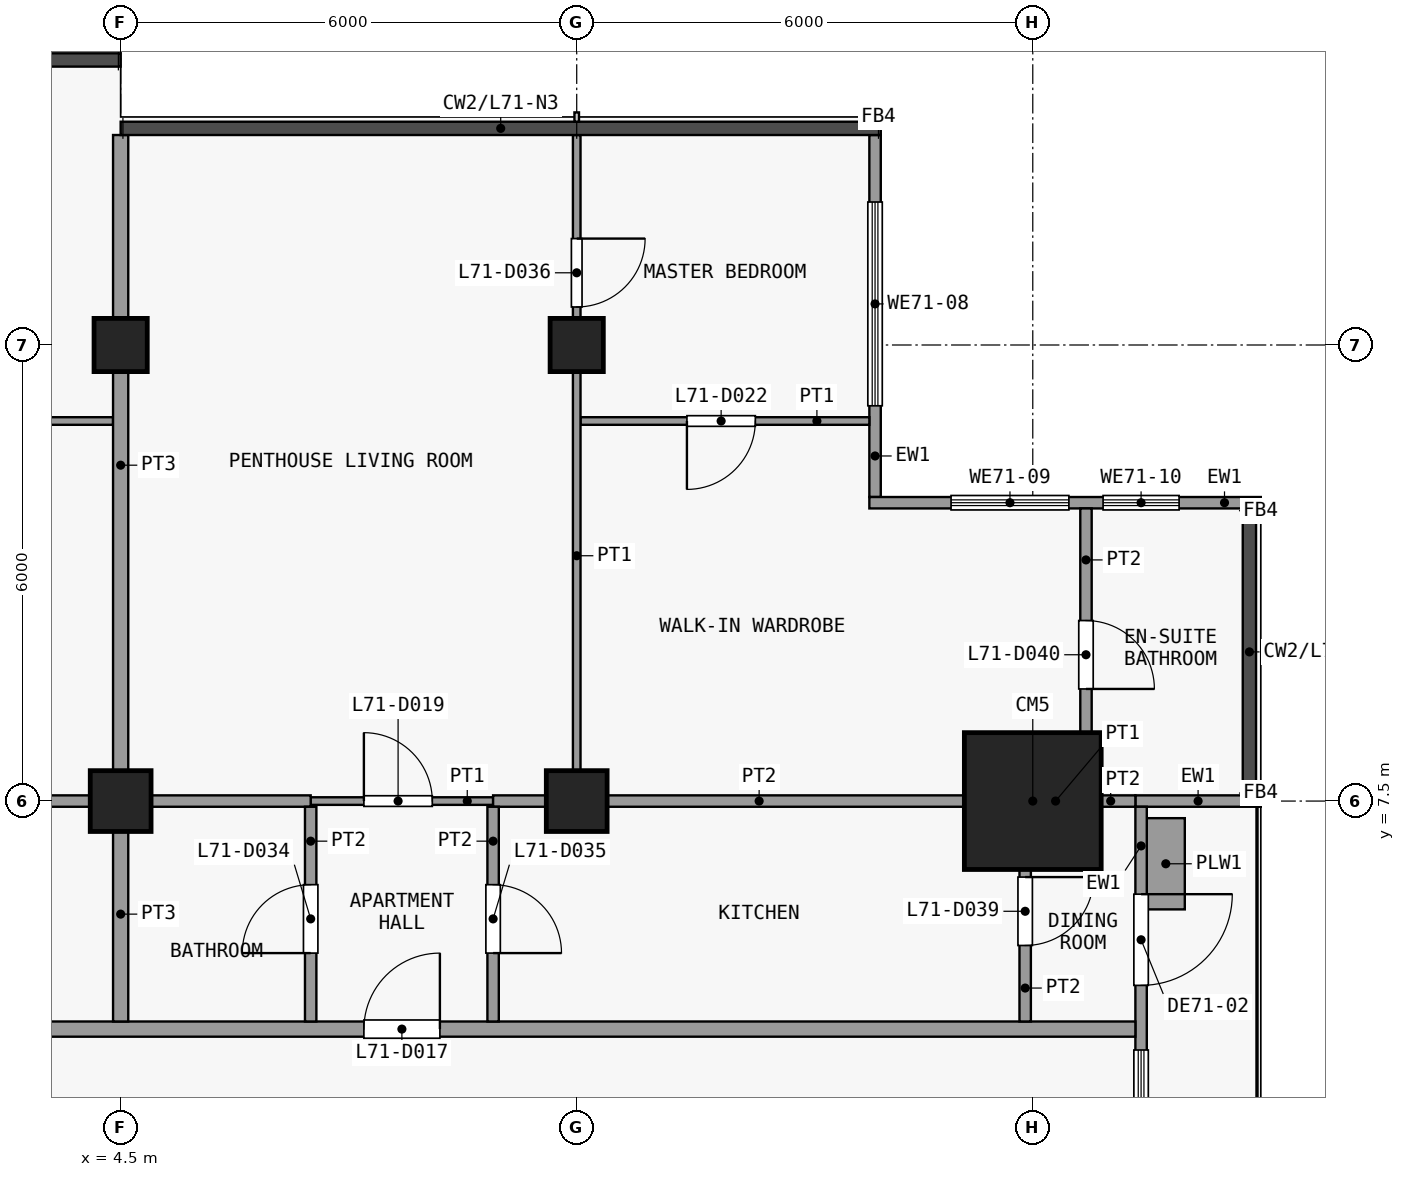
"""IFC4 building model, lengths in metres.
Left out: names, types, materials, properties, quantities, classifications, styles, units other than length and angle.
Written with IfcOpenShell. Run it as: python <this file> out.ifc"""

import sys

from ifc_helpers import new_model, si_unit, direction, frame, frame_2d, origin, origin_2d, place, context, subcontext, project, spatial, rectangle, extrude, element, fill, save


model = new_model("IFC4")
c1 = context("Model", 3, precision=1e-05, world=origin(), true_north=direction((0.0, 1.0)))
c2 = subcontext(c1, "Body", "Model", "MODEL_VIEW")
j1 = project(units=[si_unit("LENGTHUNIT", "METRE"), si_unit("PLANEANGLEUNIT", "RADIAN")], contexts=[c1])
p1 = place(None, origin())
s1 = spatial("IfcSite", under=j1, at=p1, CompositionType="ELEMENT")
p2 = place(p1, origin())
s2 = spatial("IfcBuilding", under=s1, at=p2, CompositionType="ELEMENT")
p3 = place(p2, frame((0.0, 0.0, 280.7)))
s3 = spatial("IfcBuildingStorey", under=s2, at=p3, CompositionType="ELEMENT", Elevation=280.7)
p4 = place(p3, frame((4.5, 7.5, 0.0), z_axis=(0.0, 0.0, 1.0), x_axis=(1.0, 0.0, 0.0)))
e1 = element("IfcColumn", 1, at=p4, inside=s3, PredefinedType="COLUMN", context=c2, shape_type="SweptSolid", body=[
    extrude(rectangle(XDim=0.8, YDim=0.8, at=origin_2d()), origin(), (0.0, 0.0, 1.0), 3.6),
])
p5 = place(p3, frame((4.5, 13.5, 0.0), z_axis=(0.0, 0.0, 1.0), x_axis=(1.0, 0.0, 0.0)))
e2 = element("IfcColumn", 2, at=p5, inside=s3, PredefinedType="COLUMN", context=c2, shape_type="SweptSolid", body=[
    extrude(rectangle(XDim=0.7, YDim=0.7, at=origin_2d()), origin(), (0.0, 0.0, 1.0), 3.6),
])
p6 = place(p3, frame((10.5, 7.5, 0.0), z_axis=(0.0, 0.0, 1.0), x_axis=(1.0, 0.0, 0.0)))
e3 = element("IfcColumn", 3, at=p6, inside=s3, PredefinedType="COLUMN", context=c2, shape_type="SweptSolid", body=[
    extrude(rectangle(XDim=0.8, YDim=0.8, at=origin_2d()), origin(), (0.0, 0.0, 1.0), 3.6),
])
p7 = place(p3, frame((10.5, 13.5, 0.0), z_axis=(0.0, 0.0, 1.0), x_axis=(1.0, 0.0, 0.0)))
e4 = element("IfcColumn", 4, at=p7, inside=s3, PredefinedType="COLUMN", context=c2, shape_type="SweptSolid", body=[
    extrude(rectangle(XDim=0.7, YDim=0.7, at=origin_2d()), origin(), (0.0, 0.0, 1.0), 3.6),
])
p8 = place(p3, frame((16.5, 7.5, 0.0), z_axis=(0.0, 0.0, 1.0), x_axis=(1.0, 0.0, 0.0)))
e5 = element("IfcColumn", 5, at=p8, inside=s3, PredefinedType="COLUMN", context=c2, shape_type="SweptSolid", body=[
    extrude(rectangle(XDim=1.8, YDim=1.8, at=origin_2d()), origin(), (0.0, 0.0, 1.0), 3.6),
])
p9 = place(p3, frame((14.425, 16.262, 0.0), z_axis=(0.0, 0.0, 1.0), x_axis=(0.0, -1.0, 0.0)))
e6 = element("IfcWall", 6, at=p9, inside=s3, PredefinedType="SOLIDWALL", context=c2, shape_type="SweptSolid", body=[
    extrude(rectangle(XDim=4.762, YDim=0.15, at=frame_2d((2.381, 0.0))), origin(), (0.0, 0.0, 1.0), 3.3),
])
p10 = place(p9, frame((0.881, 0.0, 0.9)))
e7 = element("IfcOpeningElement", 7, at=p10, cuts=e6, PredefinedType="OPENING", context=c2, shape_type="SweptSolid", body=[
    extrude(rectangle(XDim=2.681, YDim=2.4, at=frame_2d((1.34, 1.2))), frame((0.0, 0.085, 0.0), z_axis=(0.0, -1.0, 0.0), x_axis=(1.0, 0.0, 0.0)), (0.0, 0.0, 1.0), 0.17),
])
p11 = place(p3, frame((14.35, 11.425, 0.0), z_axis=(0.0, 0.0, 1.0), x_axis=(1.0, 0.0, 0.0)))
e8 = element("IfcWall", 8, at=p11, inside=s3, PredefinedType="SOLIDWALL", context=c2, shape_type="SweptSolid", body=[
    extrude(rectangle(XDim=5.15, YDim=0.15, at=frame_2d((2.575, 0.0))), origin(), (0.0, 0.0, 1.0), 3.3),
])
p12 = place(p11, frame((1.075, 0.0, 0.9)))
e9 = element("IfcOpeningElement", 9, at=p12, cuts=e8, PredefinedType="OPENING", context=c2, shape_type="SweptSolid", body=[
    extrude(rectangle(XDim=1.55, YDim=2.4, at=frame_2d((0.775, 1.2))), frame((0.0, 0.085, 0.0), z_axis=(0.0, -1.0, 0.0), x_axis=(1.0, 0.0, 0.0)), (0.0, 0.0, 1.0), 0.17),
])
p13 = place(p11, frame((3.075, 0.0, 0.9)))
e10 = element("IfcOpeningElement", 10, at=p13, cuts=e8, PredefinedType="OPENING", context=c2, shape_type="SweptSolid", body=[
    extrude(rectangle(XDim=1.0, YDim=2.4, at=frame_2d((0.5, 1.2))), frame((0.0, 0.085, 0.0), z_axis=(0.0, -1.0, 0.0), x_axis=(1.0, 0.0, 0.0)), (0.0, 0.0, 1.0), 0.17),
])
p14 = place(p3, frame((17.85, 7.5, 0.0), z_axis=(0.0, 0.0, 1.0), x_axis=(1.0, 0.0, 0.0)))
e11 = element("IfcWall", 11, at=p14, inside=s3, PredefinedType="SOLIDWALL", context=c2, shape_type="SweptSolid", body=[
    extrude(rectangle(XDim=1.65, YDim=0.15, at=frame_2d((0.825, 0.0))), origin(), (0.0, 0.0, 1.0), 3.3),
])
p15 = place(p3, frame((17.925, 7.425, 0.0), z_axis=(0.0, 0.0, 1.0), x_axis=(0.0, -1.0, 0.0)))
e12 = element("IfcWall", 12, at=p15, inside=s3, PredefinedType="SOLIDWALL", context=c2, shape_type="SweptSolid", body=[
    extrude(rectangle(XDim=5.85, YDim=0.15, at=frame_2d((2.925, 0.0))), origin(), (0.0, 0.0, 1.0), 3.3),
])
p16 = place(p15, frame((1.15, 0.0, 0.0)))
e13 = element("IfcOpeningElement", 13, at=p16, cuts=e12, PredefinedType="OPENING", context=c2, shape_type="SweptSolid", body=[
    extrude(rectangle(XDim=1.2, YDim=2.4, at=frame_2d((0.6, 1.2))), frame((0.0, 0.085, 0.0), z_axis=(0.0, -1.0, 0.0), x_axis=(1.0, 0.0, 0.0)), (0.0, 0.0, 1.0), 0.17),
])
p17 = place(p15, frame((3.2, 0.0, 0.9)))
e14 = element("IfcOpeningElement", 14, at=p17, cuts=e12, PredefinedType="OPENING", context=c2, shape_type="SweptSolid", body=[
    extrude(rectangle(XDim=1.8, YDim=2.1, at=frame_2d((0.9, 1.05))), frame((0.0, 0.085, 0.0), z_axis=(0.0, -1.0, 0.0), x_axis=(1.0, 0.0, 0.0)), (0.0, 0.0, 1.0), 0.17),
])
p18 = place(p3, frame((18.25, 6.075, 0.0), z_axis=(0.0, 0.0, 1.0), x_axis=(0.0, 1.0, 0.0)))
e15 = element("IfcWall", 15, at=p18, inside=s3, PredefinedType="USERDEFINED", context=c2, shape_type="SweptSolid", body=[
    extrude(rectangle(XDim=1.2, YDim=0.5, at=frame_2d((0.6, 0.0))), origin(), (0.0, 0.0, 1.0), 0.9),
])
p19 = place(p3, frame((-20.25, 4.5, 0.0), z_axis=(0.0, 0.0, 1.0), x_axis=(1.0, 0.0, 0.0)))
e16 = element("IfcWall", 16, at=p19, inside=s3, PredefinedType="PARTITIONING", context=c2, shape_type="SweptSolid", body=[
    extrude(rectangle(XDim=38.1, YDim=0.2, at=frame_2d((19.05, 0.0))), origin(), (0.0, 0.0, 1.0), 3.3),
])
p20 = place(p19, frame((13.95, 0.0, 0.0)))
e17 = element("IfcOpeningElement", 17, at=p20, cuts=e16, PredefinedType="OPENING", context=c2, shape_type="SweptSolid", body=[
    extrude(rectangle(XDim=1.0, YDim=2.1, at=frame_2d((0.5, 1.05))), frame((0.0, 0.11, 0.0), z_axis=(0.0, -1.0, 0.0), x_axis=(1.0, 0.0, 0.0)), (0.0, 0.0, 1.0), 0.22),
])
p21 = place(p19, frame((27.95, 0.0, 0.0)))
e18 = element("IfcOpeningElement", 18, at=p21, cuts=e16, PredefinedType="OPENING", context=c2, shape_type="SweptSolid", body=[
    extrude(rectangle(XDim=1.0, YDim=2.1, at=frame_2d((0.5, 1.05))), frame((0.0, 0.11, 0.0), z_axis=(0.0, -1.0, 0.0), x_axis=(1.0, 0.0, 0.0)), (0.0, 0.0, 1.0), 0.22),
])
p22 = place(p3, frame((7.0, 7.5, 0.0), z_axis=(0.0, 0.0, 1.0), x_axis=(1.0, 0.0, 0.0)))
e19 = element("IfcWall", 19, at=p22, inside=s3, PredefinedType="PARTITIONING", context=c2, shape_type="SweptSolid", body=[
    extrude(rectangle(XDim=2.4, YDim=0.1, at=frame_2d((1.2, 0.0))), origin(), (0.0, 0.0, 1.0), 3.3),
])
p23 = place(p22, frame((0.7, 0.0, 0.0)))
e20 = element("IfcOpeningElement", 20, at=p23, cuts=e19, PredefinedType="OPENING", context=c2, shape_type="SweptSolid", body=[
    extrude(rectangle(XDim=0.9, YDim=2.1, at=frame_2d((0.45, 1.05))), frame((0.0, 0.06, 0.0), z_axis=(0.0, -1.0, 0.0), x_axis=(1.0, 0.0, 0.0)), (0.0, 0.0, 1.0), 0.12),
])
p24 = place(p3, frame((16.4, 7.5, 0.0), z_axis=(0.0, 0.0, 1.0), x_axis=(1.0, 0.0, 0.0)))
e21 = element("IfcWall", 21, at=p24, inside=s3, PredefinedType="PARTITIONING", context=c2, shape_type="SweptSolid", body=[
    extrude(rectangle(XDim=0.8, YDim=0.1, at=frame_2d((0.4, 0.0))), origin(), (0.0, 0.0, 1.0), 3.3),
])
p25 = place(p3, frame((-4.5, 7.5, 0.0), z_axis=(0.0, 0.0, 1.0), x_axis=(1.0, 0.0, 0.0)))
e22 = element("IfcWall", 22, at=p25, inside=s3, PredefinedType="PARTITIONING", context=c2, shape_type="SweptSolid", body=[
    extrude(rectangle(XDim=11.5, YDim=0.15, at=frame_2d((5.75, 0.0))), origin(), (0.0, 0.0, 1.0), 3.3),
])
p26 = place(p3, frame((9.4, 7.5, 0.0), z_axis=(0.0, 0.0, 1.0), x_axis=(1.0, 0.0, 0.0)))
e23 = element("IfcWall", 23, at=p26, inside=s3, PredefinedType="PARTITIONING", context=c2, shape_type="SweptSolid", body=[
    extrude(rectangle(XDim=7.0, YDim=0.15, at=frame_2d((3.5, 0.0))), origin(), (0.0, 0.0, 1.0), 3.3),
])
p27 = place(p3, frame((17.2, 7.5, 0.0), z_axis=(0.0, 0.0, 1.0), x_axis=(1.0, 0.0, 0.0)))
e24 = element("IfcWall", 24, at=p27, inside=s3, PredefinedType="PARTITIONING", context=c2, shape_type="SweptSolid", body=[
    extrude(rectangle(XDim=0.65, YDim=0.15, at=frame_2d((0.325, 0.0))), origin(), (0.0, 0.0, 1.0), 3.3),
])
p28 = place(p3, frame((-4.45, 12.5, 0.0), z_axis=(0.0, 0.0, 1.0), x_axis=(1.0, 0.0, 0.0)))
e25 = element("IfcWall", 25, at=p28, inside=s3, PredefinedType="PARTITIONING", context=c2, shape_type="SweptSolid", body=[
    extrude(rectangle(XDim=8.85, YDim=0.1, at=frame_2d((4.425, 0.0))), origin(), (0.0, 0.0, 1.0), 3.3),
])
p29 = place(p28, frame((4.0, 0.0, 0.0)))
e26 = element("IfcOpeningElement", 26, at=p29, cuts=e25, PredefinedType="OPENING", context=c2, shape_type="SweptSolid", body=[
    extrude(rectangle(XDim=0.9, YDim=2.1, at=frame_2d((0.45, 1.05))), frame((0.0, 0.06, 0.0), z_axis=(0.0, -1.0, 0.0), x_axis=(1.0, 0.0, 0.0)), (0.0, 0.0, 1.0), 0.12),
])
p30 = place(p3, frame((10.55, 12.5, 0.0), z_axis=(0.0, 0.0, 1.0), x_axis=(1.0, 0.0, 0.0)))
e27 = element("IfcWall", 27, at=p30, inside=s3, PredefinedType="PARTITIONING", context=c2, shape_type="SweptSolid", body=[
    extrude(rectangle(XDim=3.8, YDim=0.1, at=frame_2d((1.9, 0.0))), origin(), (0.0, 0.0, 1.0), 3.3),
])
p31 = place(p30, frame((1.4, 0.0, 0.0)))
e28 = element("IfcOpeningElement", 28, at=p31, cuts=e27, PredefinedType="OPENING", context=c2, shape_type="SweptSolid", body=[
    extrude(rectangle(XDim=0.9, YDim=2.1, at=frame_2d((0.45, 1.05))), frame((0.0, 0.06, 0.0), z_axis=(0.0, -1.0, 0.0), x_axis=(1.0, 0.0, 0.0)), (0.0, 0.0, 1.0), 0.12),
])
p32 = place(p3, frame((4.5, 4.6, 0.0), z_axis=(0.0, 0.0, 1.0), x_axis=(0.0, 1.0, 0.0)))
e29 = element("IfcWall", 29, at=p32, inside=s3, PredefinedType="PARTITIONING", context=c2, shape_type="SweptSolid", body=[
    extrude(rectangle(XDim=2.825, YDim=0.2, at=frame_2d((1.413, 0.0))), origin(), (0.0, 0.0, 1.0), 3.3),
])
p33 = place(p3, frame((4.5, 7.575, 0.0), z_axis=(0.0, 0.0, 1.0), x_axis=(0.0, 1.0, 0.0)))
e30 = element("IfcWall", 30, at=p33, inside=s3, PredefinedType="PARTITIONING", context=c2, shape_type="SweptSolid", body=[
    extrude(rectangle(XDim=8.688, YDim=0.2, at=frame_2d((4.344, 0.0))), origin(), (0.0, 0.0, 1.0), 3.3),
])
p34 = place(p3, frame((7.0, 4.6, 0.0), z_axis=(0.0, 0.0, 1.0), x_axis=(0.0, 1.0, 0.0)))
e31 = element("IfcWall", 31, at=p34, inside=s3, PredefinedType="PARTITIONING", context=c2, shape_type="SweptSolid", body=[
    extrude(rectangle(XDim=2.825, YDim=0.15, at=frame_2d((1.413, 0.0))), origin(), (0.0, 0.0, 1.0), 3.3),
])
p35 = place(p34, frame((0.9, 0.0, 0.0)))
e32 = element("IfcOpeningElement", 32, at=p35, cuts=e31, PredefinedType="OPENING", context=c2, shape_type="SweptSolid", body=[
    extrude(rectangle(XDim=0.9, YDim=2.1, at=frame_2d((0.45, 1.05))), frame((0.0, 0.085, 0.0), z_axis=(0.0, -1.0, 0.0), x_axis=(1.0, 0.0, 0.0)), (0.0, 0.0, 1.0), 0.17),
])
p36 = place(p3, frame((9.4, 4.6, 0.0), z_axis=(0.0, 0.0, 1.0), x_axis=(0.0, 1.0, 0.0)))
e33 = element("IfcWall", 33, at=p36, inside=s3, PredefinedType="PARTITIONING", context=c2, shape_type="SweptSolid", body=[
    extrude(rectangle(XDim=2.825, YDim=0.15, at=frame_2d((1.413, 0.0))), origin(), (0.0, 0.0, 1.0), 3.3),
])
p37 = place(p36, frame((0.9, 0.0, 0.0)))
e34 = element("IfcOpeningElement", 34, at=p37, cuts=e33, PredefinedType="OPENING", context=c2, shape_type="SweptSolid", body=[
    extrude(rectangle(XDim=0.9, YDim=2.1, at=frame_2d((0.45, 1.05))), frame((0.0, 0.085, 0.0), z_axis=(0.0, -1.0, 0.0), x_axis=(1.0, 0.0, 0.0)), (0.0, 0.0, 1.0), 0.17),
])
p38 = place(p3, frame((10.5, 7.575, 0.0), z_axis=(0.0, 0.0, 1.0), x_axis=(0.0, 1.0, 0.0)))
e35 = element("IfcWall", 35, at=p38, inside=s3, PredefinedType="PARTITIONING", context=c2, shape_type="SweptSolid", body=[
    extrude(rectangle(XDim=8.688, YDim=0.1, at=frame_2d((4.344, 0.0))), origin(), (0.0, 0.0, 1.0), 3.3),
])
p39 = place(p38, frame((6.425, 0.0, 0.0)))
e36 = element("IfcOpeningElement", 36, at=p39, cuts=e35, PredefinedType="OPENING", context=c2, shape_type="SweptSolid", body=[
    extrude(rectangle(XDim=0.9, YDim=2.1, at=frame_2d((0.45, 1.05))), frame((0.0, 0.06, 0.0), z_axis=(0.0, -1.0, 0.0), x_axis=(1.0, 0.0, 0.0)), (0.0, 0.0, 1.0), 0.12),
])
p40 = place(p3, frame((16.4, 4.6, 0.0), z_axis=(0.0, 0.0, 1.0), x_axis=(0.0, 1.0, 0.0)))
e37 = element("IfcWall", 37, at=p40, inside=s3, PredefinedType="PARTITIONING", context=c2, shape_type="SweptSolid", body=[
    extrude(rectangle(XDim=2.825, YDim=0.15, at=frame_2d((1.413, 0.0))), origin(), (0.0, 0.0, 1.0), 3.3),
])
p41 = place(p40, frame((1.0, 0.0, 0.0)))
e38 = element("IfcOpeningElement", 38, at=p41, cuts=e37, PredefinedType="OPENING", context=c2, shape_type="SweptSolid", body=[
    extrude(rectangle(XDim=0.9, YDim=2.1, at=frame_2d((0.45, 1.05))), frame((0.0, 0.085, 0.0), z_axis=(0.0, -1.0, 0.0), x_axis=(1.0, 0.0, 0.0)), (0.0, 0.0, 1.0), 0.17),
])
p42 = place(p3, frame((17.2, 7.575, 0.0), z_axis=(0.0, 0.0, 1.0), x_axis=(0.0, 1.0, 0.0)))
e39 = element("IfcWall", 39, at=p42, inside=s3, PredefinedType="PARTITIONING", context=c2, shape_type="SweptSolid", body=[
    extrude(rectangle(XDim=3.775, YDim=0.15, at=frame_2d((1.888, 0.0))), origin(), (0.0, 0.0, 1.0), 3.3),
])
p43 = place(p42, frame((1.4, 0.0, 0.0)))
e40 = element("IfcOpeningElement", 40, at=p43, cuts=e39, PredefinedType="OPENING", context=c2, shape_type="SweptSolid", body=[
    extrude(rectangle(XDim=0.9, YDim=2.1, at=frame_2d((0.45, 1.05))), frame((0.0, 0.085, 0.0), z_axis=(0.0, -1.0, 0.0), x_axis=(1.0, 0.0, 0.0)), (0.0, 0.0, 1.0), 0.17),
])
p44 = place(p10, origin())
e41 = element("IfcWindow", 41, at=p44, inside=s3, PartitioningType="SINGLE_PANEL", PredefinedType="WINDOW", context=c2, shape_type="SweptSolid", body=[
    extrude(rectangle(XDim=2.681, YDim=2.4, at=frame_2d((1.34, 1.2))), frame((0.0, 0.03, 0.0), z_axis=(0.0, -1.0, 0.0), x_axis=(1.0, 0.0, 0.0)), (0.0, 0.0, 1.0), 0.06),
])
fill(e7, e41)
p45 = place(p12, origin())
e42 = element("IfcWindow", 42, at=p45, inside=s3, PartitioningType="SINGLE_PANEL", PredefinedType="WINDOW", context=c2, shape_type="SweptSolid", body=[
    extrude(rectangle(XDim=1.55, YDim=2.4, at=frame_2d((0.775, 1.2))), frame((0.0, 0.03, 0.0), z_axis=(0.0, -1.0, 0.0), x_axis=(1.0, 0.0, 0.0)), (0.0, 0.0, 1.0), 0.06),
])
fill(e9, e42)
p46 = place(p13, origin())
e43 = element("IfcWindow", 43, at=p46, inside=s3, PartitioningType="SINGLE_PANEL", PredefinedType="WINDOW", context=c2, shape_type="SweptSolid", body=[
    extrude(rectangle(XDim=1.0, YDim=2.4, at=frame_2d((0.5, 1.2))), frame((0.0, 0.03, 0.0), z_axis=(0.0, -1.0, 0.0), x_axis=(1.0, 0.0, 0.0)), (0.0, 0.0, 1.0), 0.06),
])
fill(e10, e43)
p47 = place(p16, origin())
e44 = element("IfcDoor", 44, at=p47, inside=s3, OperationType="SINGLE_SWING_LEFT", PredefinedType="DOOR", context=c2, shape_type="SweptSolid", body=[
    extrude(rectangle(XDim=1.2, YDim=2.4, at=frame_2d((0.6, 1.2))), frame((0.0, 0.025, 0.0), z_axis=(0.0, -1.0, 0.0), x_axis=(1.0, 0.0, 0.0)), (0.0, 0.0, 1.0), 0.05),
])
fill(e13, e44)
p48 = place(p17, origin())
e45 = element("IfcWindow", 45, at=p48, inside=s3, PartitioningType="SINGLE_PANEL", PredefinedType="WINDOW", context=c2, shape_type="SweptSolid", body=[
    extrude(rectangle(XDim=1.8, YDim=2.1, at=frame_2d((0.9, 1.05))), frame((0.0, 0.03, 0.0), z_axis=(0.0, -1.0, 0.0), x_axis=(1.0, 0.0, 0.0)), (0.0, 0.0, 1.0), 0.06),
])
fill(e14, e45)
p49 = place(p21, origin())
e46 = element("IfcDoor", 46, at=p49, inside=s3, OperationType="SINGLE_SWING_LEFT", PredefinedType="DOOR", context=c2, shape_type="SweptSolid", body=[
    extrude(rectangle(XDim=1.0, YDim=2.1, at=frame_2d((0.5, 1.05))), frame((0.0, 0.025, 0.0), z_axis=(0.0, -1.0, 0.0), x_axis=(1.0, 0.0, 0.0)), (0.0, 0.0, 1.0), 0.05),
])
fill(e18, e46)
p50 = place(p23, origin())
e47 = element("IfcDoor", 47, at=p50, inside=s3, OperationType="SINGLE_SWING_RIGHT", PredefinedType="DOOR", context=c2, shape_type="SweptSolid", body=[
    extrude(rectangle(XDim=0.9, YDim=2.1, at=frame_2d((0.45, 1.05))), frame((0.0, 0.025, 0.0), z_axis=(0.0, -1.0, 0.0), x_axis=(1.0, 0.0, 0.0)), (0.0, 0.0, 1.0), 0.05),
])
fill(e20, e47)
p51 = place(p31, origin())
e48 = element("IfcDoor", 48, at=p51, inside=s3, OperationType="SINGLE_SWING_LEFT", PredefinedType="DOOR", context=c2, shape_type="SweptSolid", body=[
    extrude(rectangle(XDim=0.9, YDim=2.1, at=frame_2d((0.45, 1.05))), frame((0.0, 0.025, 0.0), z_axis=(0.0, -1.0, 0.0), x_axis=(1.0, 0.0, 0.0)), (0.0, 0.0, 1.0), 0.05),
])
fill(e28, e48)
p52 = place(p35, origin())
e49 = element("IfcDoor", 49, at=p52, inside=s3, OperationType="SINGLE_SWING_RIGHT", PredefinedType="DOOR", context=c2, shape_type="SweptSolid", body=[
    extrude(rectangle(XDim=0.9, YDim=2.1, at=frame_2d((0.45, 1.05))), frame((0.0, 0.025, 0.0), z_axis=(0.0, -1.0, 0.0), x_axis=(1.0, 0.0, 0.0)), (0.0, 0.0, 1.0), 0.05),
])
fill(e32, e49)
p53 = place(p37, origin())
e50 = element("IfcDoor", 50, at=p53, inside=s3, OperationType="SINGLE_SWING_LEFT", PredefinedType="DOOR", context=c2, shape_type="SweptSolid", body=[
    extrude(rectangle(XDim=0.9, YDim=2.1, at=frame_2d((0.45, 1.05))), frame((0.0, 0.025, 0.0), z_axis=(0.0, -1.0, 0.0), x_axis=(1.0, 0.0, 0.0)), (0.0, 0.0, 1.0), 0.05),
])
fill(e34, e50)
p54 = place(p39, origin())
e51 = element("IfcDoor", 51, at=p54, inside=s3, OperationType="SINGLE_SWING_RIGHT", PredefinedType="DOOR", context=c2, shape_type="SweptSolid", body=[
    extrude(rectangle(XDim=0.9, YDim=2.1, at=frame_2d((0.45, 1.05))), frame((0.0, 0.025, 0.0), z_axis=(0.0, -1.0, 0.0), x_axis=(1.0, 0.0, 0.0)), (0.0, 0.0, 1.0), 0.05),
])
fill(e36, e51)
p55 = place(p41, origin())
e52 = element("IfcDoor", 52, at=p55, inside=s3, OperationType="SINGLE_SWING_RIGHT", PredefinedType="DOOR", context=c2, shape_type="SweptSolid", body=[
    extrude(rectangle(XDim=0.9, YDim=2.1, at=frame_2d((0.45, 1.05))), frame((0.0, 0.025, 0.0), z_axis=(0.0, -1.0, 0.0), x_axis=(1.0, 0.0, 0.0)), (0.0, 0.0, 1.0), 0.05),
])
fill(e38, e52)
p56 = place(p43, origin())
e53 = element("IfcDoor", 53, at=p56, inside=s3, OperationType="SINGLE_SWING_LEFT", PredefinedType="DOOR", context=c2, shape_type="SweptSolid", body=[
    extrude(rectangle(XDim=0.9, YDim=2.1, at=frame_2d((0.45, 1.05))), frame((0.0, 0.025, 0.0), z_axis=(0.0, -1.0, 0.0), x_axis=(1.0, 0.0, 0.0)), (0.0, 0.0, 1.0), 0.05),
])
fill(e40, e53)
save(model, sys.argv[1])
